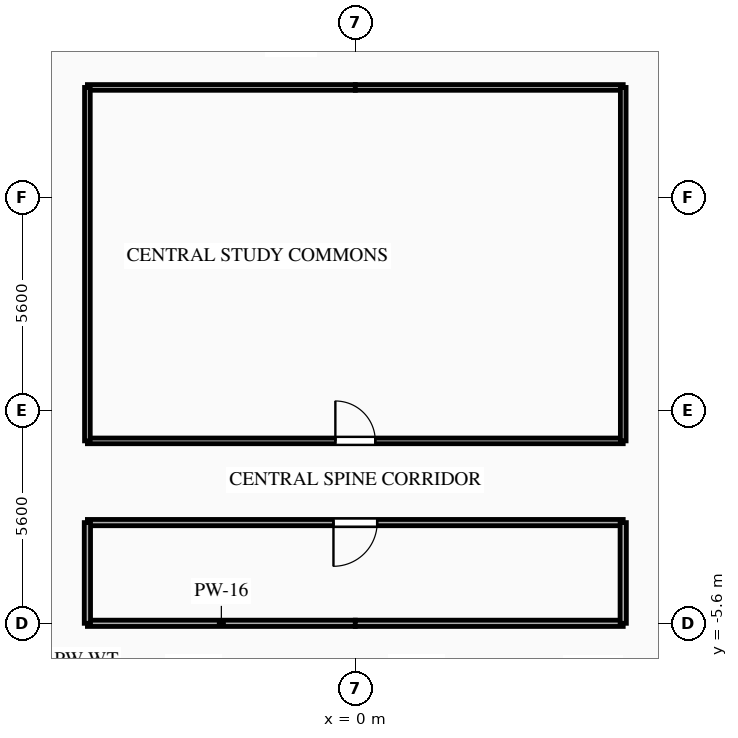
"""IFC4 building model, lengths in metres.
Left out: names, types, materials, properties, quantities, classifications, styles, units other than length and angle.
Written with IfcOpenShell. Run it as: python <this file> out.ifc"""

import sys

from ifc_helpers import new_model, si_unit, direction, frame, frame_2d, origin, place, context, subcontext, project, spatial, rectangle, extrude, element, fill, save


model = new_model("IFC4")
c1 = context("Model", 3, precision=1e-05, world=origin(), true_north=direction((0.0, 1.0)))
c2 = subcontext(c1, "Body", "Model", "MODEL_VIEW")
j1 = project(units=[si_unit("LENGTHUNIT", "METRE"), si_unit("PLANEANGLEUNIT", "RADIAN")], contexts=[c1])
p1 = place(None, origin())
s1 = spatial("IfcSite", under=j1, at=p1, CompositionType="ELEMENT")
p2 = place(p1, origin())
s2 = spatial("IfcBuilding", under=s1, at=p2, CompositionType="ELEMENT")
p3 = place(p2, frame((0.0, 0.0, 147.75)))
s3 = spatial("IfcBuildingStorey", under=s2, at=p3, CompositionType="ELEMENT", Elevation=147.75)
for number, where, z_axis, x_axis in (
    (1, (0.0, 8.5, 0.0), (0.0, 0.0, 1.0), (-1.0, 0.0, 0.0)),
    (2, (7.05, 8.5, 0.0), (0.0, 0.0, 1.0), (-1.0, 0.0, 0.0)),
):
    element("IfcWall", number, at=place(p3, frame(where, z_axis=z_axis, x_axis=x_axis)), inside=s3, PredefinedType="PARTITIONING", context=c2, shape_type="SweptSolid", body=[
        extrude(rectangle(XDim=7.05, YDim=0.15, at=frame_2d((3.525, 0.0))), origin(), (0.0, 0.0, 1.0), 3.04),
    ])
for number, where, z_axis, x_axis in (
    (3, (-7.05, -5.6, 0.0), (0.0, 0.0, 1.0), (1.0, 0.0, 0.0)),
    (4, (0.0, -5.6, 0.0), (0.0, 0.0, 1.0), (1.0, 0.0, 0.0)),
):
    element("IfcWall", number, at=place(p3, frame(where, z_axis=z_axis, x_axis=x_axis)), inside=s3, PredefinedType="PARTITIONING", context=c2, shape_type="SweptSolid", body=[
        extrude(rectangle(XDim=7.05, YDim=0.165, at=frame_2d((3.525, 0.0))), origin(), (0.0, 0.0, 1.0), 2.525),
    ])
p4 = place(p3, frame((-7.05, -0.8, 0.0), z_axis=(0.0, 0.0, 1.0), x_axis=(1.0, 0.0, 0.0)))
e5 = element("IfcWall", 5, at=p4, inside=s3, PredefinedType="PARTITIONING", context=c2, shape_type="SweptSolid", body=[
    extrude(rectangle(XDim=14.1, YDim=0.15, at=frame_2d((7.05, 0.0))), origin(), (0.0, 0.0, 1.0), 3.04),
])
p5 = place(p4, frame((6.525, 0.0, 0.0)))
e6 = element("IfcOpeningElement", 6, at=p5, cuts=e5, PredefinedType="OPENING", context=c2, shape_type="SweptSolid", body=[
    extrude(rectangle(XDim=1.05, YDim=2.15, at=frame_2d((0.525, 1.075))), frame((0.0, 0.085, 0.0), z_axis=(0.0, -1.0, 0.0), x_axis=(1.0, 0.0, 0.0)), (0.0, 0.0, 1.0), 0.17),
])
p6 = place(p3, frame((7.05, -2.95, 0.0), z_axis=(0.0, 0.0, 1.0), x_axis=(-1.0, 0.0, 0.0)))
e7 = element("IfcWall", 7, at=p6, inside=s3, PredefinedType="PARTITIONING", context=c2, shape_type="SweptSolid", body=[
    extrude(rectangle(XDim=14.1, YDim=0.165, at=frame_2d((7.05, 0.0))), origin(), (0.0, 0.0, 1.0), 3.04),
])
p7 = place(p6, frame((6.475, 0.0, 0.0)))
e8 = element("IfcOpeningElement", 8, at=p7, cuts=e7, PredefinedType="OPENING", context=c2, shape_type="SweptSolid", body=[
    extrude(rectangle(XDim=1.15, YDim=2.15, at=frame_2d((0.575, 1.075))), frame((0.0, 0.093, 0.0), z_axis=(0.0, -1.0, 0.0), x_axis=(1.0, 0.0, 0.0)), (0.0, 0.0, 1.0), 0.185),
])
p8 = place(p3, frame((-7.05, 8.5, 0.0), z_axis=(0.0, 0.0, 1.0), x_axis=(0.0, -1.0, 0.0)))
e9 = element("IfcWall", 9, at=p8, inside=s3, PredefinedType="PARTITIONING", context=c2, shape_type="SweptSolid", body=[
    extrude(rectangle(XDim=9.3, YDim=0.15, at=frame_2d((4.65, 0.0))), origin(), (0.0, 0.0, 1.0), 3.04),
])
p9 = place(p3, frame((-7.05, -2.95, 0.0), z_axis=(0.0, 0.0, 1.0), x_axis=(0.0, -1.0, 0.0)))
e10 = element("IfcWall", 10, at=p9, inside=s3, PredefinedType="PARTITIONING", context=c2, shape_type="SweptSolid", body=[
    extrude(rectangle(XDim=2.65, YDim=0.165, at=frame_2d((1.325, 0.0))), origin(), (0.0, 0.0, 1.0), 3.04),
])
p10 = place(p3, frame((7.05, -0.8, 0.0), z_axis=(0.0, 0.0, 1.0), x_axis=(0.0, 1.0, 0.0)))
e11 = element("IfcWall", 11, at=p10, inside=s3, PredefinedType="PARTITIONING", context=c2, shape_type="SweptSolid", body=[
    extrude(rectangle(XDim=9.3, YDim=0.15, at=frame_2d((4.65, 0.0))), origin(), (0.0, 0.0, 1.0), 3.04),
])
p11 = place(p3, frame((7.05, -5.6, 0.0), z_axis=(0.0, 0.0, 1.0), x_axis=(0.0, 1.0, 0.0)))
e12 = element("IfcWall", 12, at=p11, inside=s3, PredefinedType="PARTITIONING", context=c2, shape_type="SweptSolid", body=[
    extrude(rectangle(XDim=2.65, YDim=0.165, at=frame_2d((1.325, 0.0))), origin(), (0.0, 0.0, 1.0), 3.04),
])
p12 = place(p5, origin())
e13 = element("IfcDoor", 13, at=p12, inside=s3, OperationType="SINGLE_SWING_LEFT", PredefinedType="DOOR", context=c2, shape_type="SweptSolid", body=[
    extrude(rectangle(XDim=1.05, YDim=2.15, at=frame_2d((0.525, 1.075))), frame((0.0, 0.025, 0.0), z_axis=(0.0, -1.0, 0.0), x_axis=(1.0, 0.0, 0.0)), (0.0, 0.0, 1.0), 0.05),
])
fill(e6, e13)
p13 = place(p7, origin())
e14 = element("IfcDoor", 14, at=p13, inside=s3, OperationType="SINGLE_SWING_RIGHT", PredefinedType="DOOR", context=c2, shape_type="SweptSolid", body=[
    extrude(rectangle(XDim=1.15, YDim=2.15, at=frame_2d((0.575, 1.075))), frame((0.0, 0.025, 0.0), z_axis=(0.0, -1.0, 0.0), x_axis=(1.0, 0.0, 0.0)), (0.0, 0.0, 1.0), 0.05),
])
fill(e8, e14)
save(model, sys.argv[1])
